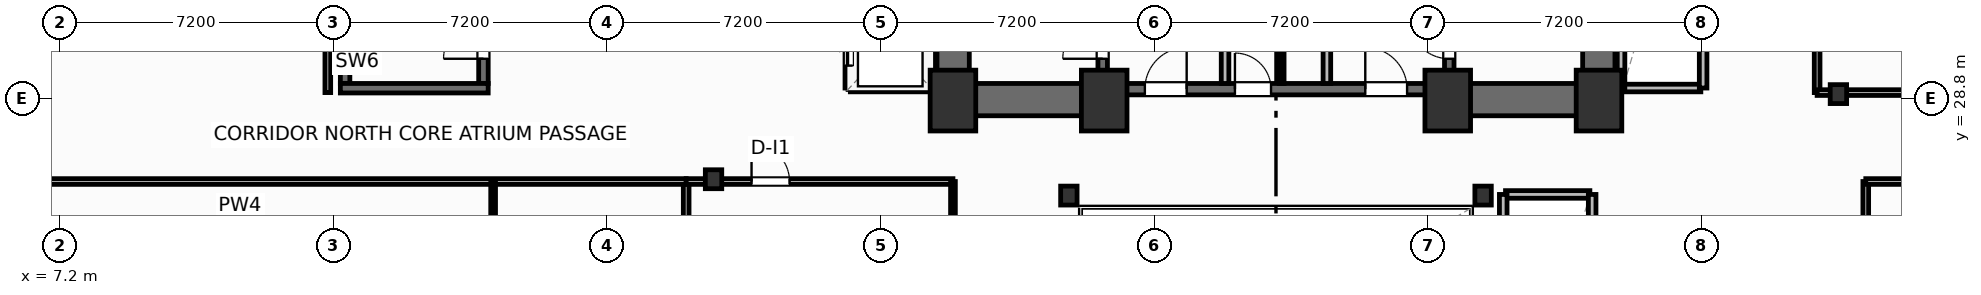
"""IFC4 building model, lengths in metres.
Left out: names, types, materials, properties, quantities, classifications, styles, units other than length and angle.
Written with IfcOpenShell. Run it as: python <this file> out.ifc"""

import sys

from ifc_helpers import new_model, si_unit, direction, frame, frame_2d, origin, origin_2d, place, context, subcontext, project, spatial, rectangle, i_section, extrude, element, fill, save


model = new_model("IFC4")
c1 = context("Model", 3, precision=1e-05, world=origin(), true_north=direction((0.0, 1.0)))
c2 = subcontext(c1, "Body", "Model", "MODEL_VIEW")
j1 = project(units=[si_unit("LENGTHUNIT", "METRE"), si_unit("PLANEANGLEUNIT", "RADIAN")], contexts=[c1])
p1 = place(None, origin())
s1 = spatial("IfcSite", under=j1, at=p1, CompositionType="ELEMENT")
p2 = place(p1, origin())
s2 = spatial("IfcBuilding", under=s1, at=p2, CompositionType="ELEMENT")
p3 = place(p2, frame((0.0, 0.0, 5.4)))
s3 = spatial("IfcBuildingStorey", under=s2, at=p3, CompositionType="ELEMENT", Elevation=5.4)
for number, where, z_axis, x_axis in (
    (1, (30.7, 28.75, 0.0), (0.0, 0.0, 1.0), (1.0, 0.0, 0.0)),
    (2, (34.68, 28.75, 0.0), (0.0, 0.0, 1.0), (1.0, 0.0, 0.0)),
    (3, (43.72, 28.75, 0.0), (0.0, 0.0, 1.0), (1.0, 0.0, 0.0)),
    (4, (47.7, 28.75, 0.0), (0.0, 0.0, 1.0), (1.0, 0.0, 0.0)),
):
    element("IfcColumn", number, at=place(p3, frame(where, z_axis=z_axis, x_axis=x_axis)), inside=s3, PredefinedType="COLUMN", context=c2, shape_type="SweptSolid", body=[
        extrude(rectangle(XDim=1.2, YDim=1.6, at=origin_2d()), origin(), (0.0, 0.0, 1.0), 5.4),
    ])
for number, where, z_axis, x_axis in (
    (5, (33.75, 26.25, 0.0), (0.0, 0.0, 1.0), (1.0, 0.0, 0.0)),
    (6, (44.65, 26.25, 0.0), (0.0, 0.0, 1.0), (1.0, 0.0, 0.0)),
    (7, (24.4, 26.68, 0.0), (0.0, 0.0, 1.0), (1.0, 0.0, 0.0)),
    (8, (54.0, 28.92, 0.0), (0.0, 0.0, 1.0), (1.0, 0.0, 0.0)),
):
    element("IfcColumn", number, at=place(p3, frame(where, z_axis=z_axis, x_axis=x_axis)), inside=s3, PredefinedType="COLUMN", context=c2, shape_type="SweptSolid", body=[
        extrude(i_section(OverallWidth=0.432, OverallDepth=0.498, WebThickness=0.056, FlangeThickness=0.089, FilletRadius=0.025, at=origin_2d()), origin(), (0.0, 0.0, 1.0), 5.4),
    ])
for number, where, z_axis, x_axis in (
    (9, (30.705, 29.2, 0.0), (0.0, 0.0, 1.0), (0.0, 1.0, 0.0)),
    (10, (47.695, 29.2, 0.0), (0.0, 0.0, 1.0), (0.0, 1.0, 0.0)),
):
    element("IfcWall", number, at=place(p3, frame(where, z_axis=z_axis, x_axis=x_axis)), inside=s3, PredefinedType="SHEAR", context=c2, shape_type="SweptSolid", body=[
        extrude(rectangle(XDim=9.22, YDim=0.85, at=frame_2d((4.61, 0.0))), origin(), (0.0, 0.0, 1.0), 5.12),
    ])
for number, where, z_axis, x_axis in (
    (11, (30.28, 28.775, 0.0), (0.0, 0.0, 1.0), (1.0, 0.0, 0.0)),
    (12, (43.6, 28.775, 0.0), (0.0, 0.0, 1.0), (1.0, 0.0, 0.0)),
):
    element("IfcWall", number, at=place(p3, frame(where, z_axis=z_axis, x_axis=x_axis)), inside=s3, PredefinedType="SHEAR", context=c2, shape_type="SweptSolid", body=[
        extrude(rectangle(XDim=4.52, YDim=0.85, at=frame_2d((2.26, 0.0))), origin(), (0.0, 0.0, 1.0), 5.12),
    ])
p4 = place(p3, frame((34.8, 29.05, 0.0), z_axis=(0.0, 0.0, 1.0), x_axis=(1.0, 0.0, 0.0)))
e13 = element("IfcWall", 13, at=p4, inside=s3, PredefinedType="SHEAR", context=c2, shape_type="SweptSolid", body=[
    extrude(rectangle(XDim=8.8, YDim=0.3, at=frame_2d((4.4, 0.0))), origin(), (0.0, 0.0, 1.0), 5.12),
])
p5 = place(p4, frame((0.95, 0.0, 0.0)))
e14 = element("IfcOpeningElement", 14, at=p5, cuts=e13, PredefinedType="OPENING", context=c2, shape_type="SweptSolid", body=[
    extrude(rectangle(XDim=1.1, YDim=2.15, at=frame_2d((0.55, 1.075))), frame((0.0, 0.16, 0.0), z_axis=(0.0, -1.0, 0.0), x_axis=(1.0, 0.0, 0.0)), (0.0, 0.0, 1.0), 0.32),
])
p6 = place(p4, frame((6.75, 0.0, 0.0)))
e15 = element("IfcOpeningElement", 15, at=p6, cuts=e13, PredefinedType="OPENING", context=c2, shape_type="SweptSolid", body=[
    extrude(rectangle(XDim=1.1, YDim=2.15, at=frame_2d((0.55, 1.075))), frame((0.0, 0.16, 0.0), z_axis=(0.0, -1.0, 0.0), x_axis=(1.0, 0.0, 0.0)), (0.0, 0.0, 1.0), 0.32),
])
p7 = place(p4, frame((3.32, 0.0, 0.0)))
e16 = element("IfcOpeningElement", 16, at=p7, cuts=e13, PredefinedType="OPENING", context=c2, shape_type="SweptSolid", body=[
    extrude(rectangle(XDim=0.95, YDim=2.15, at=frame_2d((0.475, 1.075))), frame((0.0, 0.16, 0.0), z_axis=(0.0, -1.0, 0.0), x_axis=(1.0, 0.0, 0.0)), (0.0, 0.0, 1.0), 0.32),
])
p8 = place(p3, frame((34.64, 29.2, 0.0), z_axis=(0.0, 0.0, 1.0), x_axis=(0.0, 1.0, 0.0)))
e17 = element("IfcWall", 17, at=p8, inside=s3, PredefinedType="SHEAR", context=c2, shape_type="SweptSolid", body=[
    extrude(rectangle(XDim=9.22, YDim=0.25, at=frame_2d((4.61, 0.0))), origin(), (0.0, 0.0, 1.0), 5.12),
])
p9 = place(p8, frame((0.65, 0.0, 0.0)))
e18 = element("IfcOpeningElement", 18, at=p9, cuts=e17, PredefinedType="OPENING", context=c2, shape_type="SweptSolid", body=[
    extrude(rectangle(XDim=1.05, YDim=2.15, at=frame_2d((0.525, 1.075))), frame((0.0, 0.135, 0.0), z_axis=(0.0, -1.0, 0.0), x_axis=(1.0, 0.0, 0.0)), (0.0, 0.0, 1.0), 0.27),
])
p10 = place(p3, frame((43.76, 29.2, 0.0), z_axis=(0.0, 0.0, 1.0), x_axis=(0.0, 1.0, 0.0)))
e19 = element("IfcWall", 19, at=p10, inside=s3, PredefinedType="SHEAR", context=c2, shape_type="SweptSolid", body=[
    extrude(rectangle(XDim=9.22, YDim=0.25, at=frame_2d((4.61, 0.0))), origin(), (0.0, 0.0, 1.0), 5.12),
])
p11 = place(p10, frame((0.65, 0.0, 0.0)))
e20 = element("IfcOpeningElement", 20, at=p11, cuts=e19, PredefinedType="OPENING", context=c2, shape_type="SweptSolid", body=[
    extrude(rectangle(XDim=1.05, YDim=2.15, at=frame_2d((0.525, 1.075))), frame((0.0, 0.135, 0.0), z_axis=(0.0, -1.0, 0.0), x_axis=(1.0, 0.0, 0.0)), (0.0, 0.0, 1.0), 0.27),
])
p12 = place(p3, frame((14.705, 29.2, 0.0), z_axis=(0.0, 0.0, 1.0), x_axis=(0.0, 1.0, 0.0)))
e21 = element("IfcWall", 21, at=p12, inside=s3, PredefinedType="SHEAR", context=c2, shape_type="SweptSolid", body=[
    extrude(rectangle(XDim=9.22, YDim=0.25, at=frame_2d((4.61, 0.0))), origin(), (0.0, 0.0, 1.0), 5.12),
])
p13 = place(p3, frame((18.345, 29.2, 0.0), z_axis=(0.0, 0.0, 1.0), x_axis=(0.0, 1.0, 0.0)))
e22 = element("IfcWall", 22, at=p13, inside=s3, PredefinedType="SHEAR", context=c2, shape_type="SweptSolid", body=[
    extrude(rectangle(XDim=9.22, YDim=0.25, at=frame_2d((4.61, 0.0))), origin(), (0.0, 0.0, 1.0), 5.12),
])
p14 = place(p13, frame((0.65, 0.0, 0.0)))
e23 = element("IfcOpeningElement", 23, at=p14, cuts=e22, PredefinedType="OPENING", context=c2, shape_type="SweptSolid", body=[
    extrude(rectangle(XDim=1.05, YDim=2.15, at=frame_2d((0.525, 1.075))), frame((0.0, 0.135, 0.0), z_axis=(0.0, -1.0, 0.0), x_axis=(1.0, 0.0, 0.0)), (0.0, 0.0, 1.0), 0.27),
])
p15 = place(p3, frame((14.58, 29.075, 0.0), z_axis=(0.0, 0.0, 1.0), x_axis=(1.0, 0.0, 0.0)))
e24 = element("IfcWall", 24, at=p15, inside=s3, PredefinedType="SHEAR", context=c2, shape_type="SweptSolid", body=[
    extrude(rectangle(XDim=3.89, YDim=0.25, at=frame_2d((1.945, 0.0))), origin(), (0.0, 0.0, 1.0), 5.12),
])
p16 = place(p3, frame((23.68, 0.25, 0.0), z_axis=(0.0, 0.0, 1.0), x_axis=(0.0, 1.0, 0.0)))
e25 = element("IfcWall", 25, at=p16, inside=s3, PredefinedType="PARTITIONING", context=c2, shape_type="SweptSolid", body=[
    extrude(rectangle(XDim=26.37, YDim=0.15, at=frame_2d((13.185, 0.0))), origin(), (0.0, 0.0, 1.0), 5.12),
])
p17 = place(p16, frame((14.514, 0.0, 0.0)))
e26 = element("IfcOpeningElement", 26, at=p17, cuts=e25, PredefinedType="OPENING", context=c2, shape_type="SweptSolid", body=[
    extrude(rectangle(XDim=2.0, YDim=2.05, at=frame_2d((1.0, 1.025))), frame((0.0, 0.085, 0.0), z_axis=(0.0, -1.0, 0.0), x_axis=(1.0, 0.0, 0.0)), (0.0, 0.0, 1.0), 0.17),
])
p18 = place(p3, frame((54.72, 0.25, 0.0), z_axis=(0.0, 0.0, 1.0), x_axis=(0.0, 1.0, 0.0)))
e27 = element("IfcWall", 27, at=p18, inside=s3, PredefinedType="PARTITIONING", context=c2, shape_type="SweptSolid", body=[
    extrude(rectangle(XDim=26.37, YDim=0.15, at=frame_2d((13.185, 0.0))), origin(), (0.0, 0.0, 1.0), 5.12),
])
p19 = place(p18, frame((14.514, 0.0, 0.0)))
e28 = element("IfcOpeningElement", 28, at=p19, cuts=e27, PredefinedType="OPENING", context=c2, shape_type="SweptSolid", body=[
    extrude(rectangle(XDim=2.0, YDim=2.05, at=frame_2d((1.0, 1.025))), frame((0.0, 0.085, 0.0), z_axis=(0.0, -1.0, 0.0), x_axis=(1.0, 0.0, 0.0)), (0.0, 0.0, 1.0), 0.17),
])
for number, where, z_axis, x_axis in (
    (29, (0.2, 26.62, 0.0), (0.0, 0.0, 1.0), (1.0, 0.0, 0.0)),
    (30, (54.72, 26.62, 0.0), (0.0, 0.0, 1.0), (1.0, 0.0, 0.0)),
):
    element("IfcWall", number, at=place(p3, frame(where, z_axis=z_axis, x_axis=x_axis)), inside=s3, PredefinedType="PARTITIONING", context=c2, shape_type="SweptSolid", body=[
        extrude(rectangle(XDim=23.48, YDim=0.15, at=frame_2d((11.74, 0.0))), origin(), (0.0, 0.0, 1.0), 5.12),
    ])
p20 = place(p3, frame((53.44, 28.96, 0.0), z_axis=(0.0, 0.0, 1.0), x_axis=(0.0, 1.0, 0.0)))
e31 = element("IfcWall", 31, at=p20, inside=s3, PredefinedType="PARTITIONING", context=c2, shape_type="SweptSolid", body=[
    extrude(rectangle(XDim=21.34, YDim=0.15, at=frame_2d((10.67, 0.0))), origin(), (0.0, 0.0, 1.0), 5.12),
])
p21 = place(p20, frame((6.0, 0.0, 0.0)))
e32 = element("IfcOpeningElement", 32, at=p21, cuts=e31, PredefinedType="OPENING", context=c2, shape_type="SweptSolid", body=[
    extrude(rectangle(XDim=2.0, YDim=2.05, at=frame_2d((1.0, 1.025))), frame((0.0, 0.085, 0.0), z_axis=(0.0, -1.0, 0.0), x_axis=(1.0, 0.0, 0.0)), (0.0, 0.0, 1.0), 0.17),
])
p22 = place(p3, frame((53.44, 28.96, 0.0), z_axis=(0.0, 0.0, 1.0), x_axis=(1.0, 0.0, 0.0)))
e33 = element("IfcWall", 33, at=p22, inside=s3, PredefinedType="PARTITIONING", context=c2, shape_type="SweptSolid", body=[
    extrude(rectangle(XDim=24.76, YDim=0.15, at=frame_2d((12.38, 0.0))), origin(), (0.0, 0.0, 1.0), 4.332),
])
p23 = place(p3, frame((14.25, 28.96, 0.0), z_axis=(0.0, 0.0, 1.0), x_axis=(0.0, 1.0, 0.0)))
e34 = element("IfcWall", 34, at=p23, inside=s3, PredefinedType="PARTITIONING", context=c2, shape_type="SweptSolid", body=[
    extrude(rectangle(XDim=21.34, YDim=0.15, at=frame_2d((10.67, 0.0))), origin(), (0.0, 0.0, 1.0), 5.12),
])
p24 = place(p23, frame((10.62, 0.0, 0.0)))
e35 = element("IfcOpeningElement", 35, at=p24, cuts=e34, PredefinedType="OPENING", context=c2, shape_type="SweptSolid", body=[
    extrude(rectangle(XDim=1.0, YDim=2.05, at=frame_2d((0.5, 1.025))), frame((0.0, 0.085, 0.0), z_axis=(0.0, -1.0, 0.0), x_axis=(1.0, 0.0, 0.0)), (0.0, 0.0, 1.0), 0.17),
])
p25 = place(p3, frame((23.68, 26.62, 0.0), z_axis=(0.0, 0.0, 1.0), x_axis=(1.0, 0.0, 0.0)))
e36 = element("IfcWall", 36, at=p25, inside=s3, PredefinedType="PARTITIONING", context=c2, shape_type="SweptSolid", body=[
    extrude(rectangle(XDim=7.02, YDim=0.15, at=frame_2d((3.51, 0.0))), origin(), (0.0, 0.0, 1.0), 4.332),
])
p26 = place(p25, frame((1.72, 0.0, 0.0)))
e37 = element("IfcOpeningElement", 37, at=p26, cuts=e36, PredefinedType="OPENING", context=c2, shape_type="SweptSolid", body=[
    extrude(rectangle(XDim=1.0, YDim=2.05, at=frame_2d((0.5, 1.025))), frame((0.0, 0.085, 0.0), z_axis=(0.0, -1.0, 0.0), x_axis=(1.0, 0.0, 0.0)), (0.0, 0.0, 1.0), 0.17),
])
p27 = place(p3, frame((30.7, 19.24, 0.0), z_axis=(0.0, 0.0, 1.0), x_axis=(0.0, 1.0, 0.0)))
e38 = element("IfcWall", 38, at=p27, inside=s3, PredefinedType="PARTITIONING", context=c2, shape_type="SweptSolid", body=[
    extrude(rectangle(XDim=7.38, YDim=0.125, at=frame_2d((3.69, 0.0))), origin(), (0.0, 0.0, 1.0), 5.12),
])
p28 = place(p3, frame((18.6, 19.24, 0.0), z_axis=(0.0, 0.0, 1.0), x_axis=(0.0, 1.0, 0.0)))
e39 = element("IfcWall", 39, at=p28, inside=s3, PredefinedType="PARTITIONING", context=c2, shape_type="SweptSolid", body=[
    extrude(rectangle(XDim=7.34, YDim=0.125, at=frame_2d((3.67, 0.0))), origin(), (0.0, 0.0, 1.0), 5.12),
])
for number, where, z_axis, x_axis in (
    (40, (37.86, 29.2, 0.0), (0.0, 0.0, 1.0), (0.0, 1.0, 0.0)),
    (41, (40.54, 29.2, 0.0), (0.0, 0.0, 1.0), (0.0, 1.0, 0.0)),
):
    element("IfcWall", number, at=place(p3, frame(where, z_axis=z_axis, x_axis=x_axis)), inside=s3, PredefinedType="PARTITIONING", context=c2, shape_type="SweptSolid", body=[
        extrude(rectangle(XDim=5.18, YDim=0.2, at=frame_2d((2.59, 0.0))), origin(), (0.0, 0.0, 1.0), 5.12),
    ])
p29 = place(p3, frame((39.35, 29.2, 0.0), z_axis=(0.0, 0.0, 1.0), x_axis=(0.0, 1.0, 0.0)))
e42 = element("IfcWall", 42, at=p29, inside=s3, PredefinedType="PARTITIONING", context=c2, shape_type="SweptSolid", body=[
    extrude(rectangle(XDim=5.22, YDim=0.125, at=frame_2d((2.61, 0.0))), origin(), (0.0, 0.0, 1.0), 5.12),
])
p30 = place(p29, frame((2.05, 0.0, 0.0)))
e43 = element("IfcOpeningElement", 43, at=p30, cuts=e42, PredefinedType="OPENING", context=c2, shape_type="SweptSolid", body=[
    extrude(rectangle(XDim=0.85, YDim=2.05, at=frame_2d((0.425, 1.025))), frame((0.0, 0.073, 0.0), z_axis=(0.0, -1.0, 0.0), x_axis=(1.0, 0.0, 0.0)), (0.0, 0.0, 1.0), 0.145),
])
p31 = place(p3, frame((28.0, 29.08, 0.0), z_axis=(0.0, 0.0, 1.0), x_axis=(1.0, 0.0, 0.0)))
e44 = element("IfcWall", 44, at=p31, inside=s3, PredefinedType="PARTITIONING", context=c2, shape_type="SweptSolid", body=[
    extrude(rectangle(XDim=2.1, YDim=0.2, at=frame_2d((1.05, 0.0))), origin(), (0.0, 0.0, 1.0), 5.12),
])
p32 = place(p3, frame((30.12, 29.08, 0.0), z_axis=(0.0, 0.0, 1.0), x_axis=(0.0, 1.0, 0.0)))
e45 = element("IfcWall", 45, at=p32, inside=s3, PredefinedType="PARTITIONING", context=c2, shape_type="SweptSolid", body=[
    extrude(rectangle(XDim=6.89, YDim=0.2, at=frame_2d((3.445, 0.0))), origin(), (0.0, 0.0, 1.0), 5.12),
])
p33 = place(p3, frame((27.96, 29.08, 0.0), z_axis=(0.0, 0.0, 1.0), x_axis=(0.0, 1.0, 0.0)))
e46 = element("IfcWall", 46, at=p33, inside=s3, PredefinedType="PARTITIONING", context=c2, shape_type="SweptSolid", body=[
    extrude(rectangle(XDim=6.89, YDim=0.2, at=frame_2d((3.445, 0.0))), origin(), (0.0, 0.0, 1.0), 5.12),
])
p34 = place(p33, frame((0.59, 0.0, 0.0)))
e47 = element("IfcOpeningElement", 47, at=p34, cuts=e46, PredefinedType="OPENING", context=c2, shape_type="SweptSolid", body=[
    extrude(rectangle(XDim=1.1, YDim=2.15, at=frame_2d((0.55, 1.075))), frame((0.0, 0.11, 0.0), z_axis=(0.0, -1.0, 0.0), x_axis=(1.0, 0.0, 0.0)), (0.0, 0.0, 1.0), 0.22),
])
p35 = place(p33, frame((2.89, 0.0, 0.0)))
e48 = element("IfcOpeningElement", 48, at=p35, cuts=e46, PredefinedType="OPENING", context=c2, shape_type="SweptSolid", body=[
    extrude(rectangle(XDim=1.1, YDim=2.15, at=frame_2d((0.55, 1.075))), frame((0.0, 0.11, 0.0), z_axis=(0.0, -1.0, 0.0), x_axis=(1.0, 0.0, 0.0)), (0.0, 0.0, 1.0), 0.22),
])
p36 = place(p33, frame((5.19, 0.0, 0.0)))
e49 = element("IfcOpeningElement", 49, at=p36, cuts=e46, PredefinedType="OPENING", context=c2, shape_type="SweptSolid", body=[
    extrude(rectangle(XDim=1.1, YDim=2.15, at=frame_2d((0.55, 1.075))), frame((0.0, 0.11, 0.0), z_axis=(0.0, -1.0, 0.0), x_axis=(1.0, 0.0, 0.0)), (0.0, 0.0, 1.0), 0.22),
])
p37 = place(p3, frame((48.32, 29.08, 0.0), z_axis=(0.0, 0.0, 1.0), x_axis=(1.0, 0.0, 0.0)))
e50 = element("IfcWall", 50, at=p37, inside=s3, PredefinedType="PARTITIONING", context=c2, shape_type="SweptSolid", body=[
    extrude(rectangle(XDim=2.06, YDim=0.2, at=frame_2d((1.03, 0.0))), origin(), (0.0, 0.0, 1.0), 4.332),
])
for number, where, z_axis, x_axis in (
    (51, (48.28, 29.08, 0.0), (0.0, 0.0, 1.0), (0.0, 1.0, 0.0)),
    (52, (50.44, 29.08, 0.0), (0.0, 0.0, 1.0), (0.0, 1.0, 0.0)),
):
    element("IfcWall", number, at=place(p3, frame(where, z_axis=z_axis, x_axis=x_axis)), inside=s3, PredefinedType="PARTITIONING", context=c2, shape_type="SweptSolid", body=[
        extrude(rectangle(XDim=6.89, YDim=0.2, at=frame_2d((3.445, 0.0))), origin(), (0.0, 0.0, 1.0), 5.12),
    ])
p38 = place(p3, frame((45.24, 26.28, 0.0), z_axis=(0.0, 0.0, 1.0), x_axis=(1.0, 0.0, 0.0)))
e53 = element("IfcWall", 53, at=p38, inside=s3, PredefinedType="PARTITIONING", context=c2, shape_type="SweptSolid", body=[
    extrude(rectangle(XDim=2.22, YDim=0.2, at=frame_2d((1.11, 0.0))), origin(), (0.0, 0.0, 1.0), 5.12),
])
for number, where, z_axis, x_axis in (
    (54, (45.18, 19.38, 0.0), (0.0, 0.0, 1.0), (0.0, 1.0, 0.0)),
    (55, (47.52, 19.38, 0.0), (0.0, 0.0, 1.0), (0.0, 1.0, 0.0)),
):
    element("IfcWall", number, at=place(p3, frame(where, z_axis=z_axis, x_axis=x_axis)), inside=s3, PredefinedType="PARTITIONING", context=c2, shape_type="SweptSolid", body=[
        extrude(rectangle(XDim=6.9, YDim=0.2, at=frame_2d((3.45, 0.0))), origin(), (0.0, 0.0, 1.0), 5.12),
    ])
p39 = place(p26, origin())
e56 = element("IfcDoor", 56, at=p39, inside=s3, OperationType="SINGLE_SWING_LEFT", PredefinedType="DOOR", context=c2, shape_type="SweptSolid", body=[
    extrude(rectangle(XDim=1.0, YDim=2.05, at=frame_2d((0.5, 1.025))), frame((0.0, 0.025, 0.0), z_axis=(0.0, -1.0, 0.0), x_axis=(1.0, 0.0, 0.0)), (0.0, 0.0, 1.0), 0.05),
])
fill(e37, e56)
p40 = place(p9, origin())
e57 = element("IfcDoor", 57, at=p40, inside=s3, OperationType="SINGLE_SWING_LEFT", PredefinedType="DOOR", context=c2, shape_type="SweptSolid", body=[
    extrude(rectangle(XDim=1.05, YDim=2.15, at=frame_2d((0.525, 1.075))), frame((0.0, 0.025, 0.0), z_axis=(0.0, -1.0, 0.0), x_axis=(1.0, 0.0, 0.0)), (0.0, 0.0, 1.0), 0.05),
])
fill(e18, e57)
p41 = place(p11, origin())
e58 = element("IfcDoor", 58, at=p41, inside=s3, OperationType="SINGLE_SWING_RIGHT", PredefinedType="DOOR", context=c2, shape_type="SweptSolid", body=[
    extrude(rectangle(XDim=1.05, YDim=2.15, at=frame_2d((0.525, 1.075))), frame((0.0, 0.025, 0.0), z_axis=(0.0, -1.0, 0.0), x_axis=(1.0, 0.0, 0.0)), (0.0, 0.0, 1.0), 0.05),
])
fill(e20, e58)
p42 = place(p14, origin())
e59 = element("IfcDoor", 59, at=p42, inside=s3, OperationType="SINGLE_SWING_LEFT", PredefinedType="DOOR", context=c2, shape_type="SweptSolid", body=[
    extrude(rectangle(XDim=1.05, YDim=2.15, at=frame_2d((0.525, 1.075))), frame((0.0, 0.025, 0.0), z_axis=(0.0, -1.0, 0.0), x_axis=(1.0, 0.0, 0.0)), (0.0, 0.0, 1.0), 0.05),
])
fill(e23, e59)
p43 = place(p5, origin())
e60 = element("IfcDoor", 60, at=p43, inside=s3, OperationType="SINGLE_SWING_RIGHT", PredefinedType="DOOR", context=c2, shape_type="SweptSolid", body=[
    extrude(rectangle(XDim=1.1, YDim=2.15, at=frame_2d((0.55, 1.075))), frame((0.0, 0.025, 0.0), z_axis=(0.0, -1.0, 0.0), x_axis=(1.0, 0.0, 0.0)), (0.0, 0.0, 1.0), 0.05),
])
fill(e14, e60)
p44 = place(p6, origin())
e61 = element("IfcDoor", 61, at=p44, inside=s3, OperationType="SINGLE_SWING_LEFT", PredefinedType="DOOR", context=c2, shape_type="SweptSolid", body=[
    extrude(rectangle(XDim=1.1, YDim=2.15, at=frame_2d((0.55, 1.075))), frame((0.0, 0.025, 0.0), z_axis=(0.0, -1.0, 0.0), x_axis=(1.0, 0.0, 0.0)), (0.0, 0.0, 1.0), 0.05),
])
fill(e15, e61)
p45 = place(p7, origin())
e62 = element("IfcDoor", 62, at=p45, inside=s3, OperationType="SINGLE_SWING_LEFT", PredefinedType="DOOR", context=c2, shape_type="SweptSolid", body=[
    extrude(rectangle(XDim=0.95, YDim=2.15, at=frame_2d((0.475, 1.075))), frame((0.0, 0.025, 0.0), z_axis=(0.0, -1.0, 0.0), x_axis=(1.0, 0.0, 0.0)), (0.0, 0.0, 1.0), 0.05),
])
fill(e16, e62)
p46 = place(p34, origin())
e63 = element("IfcDoor", 63, at=p46, inside=s3, OperationType="SLIDING_TO_LEFT", PredefinedType="DOOR", context=c2, shape_type="SweptSolid", body=[
    extrude(rectangle(XDim=1.1, YDim=2.15, at=frame_2d((0.55, 1.075))), frame((0.0, 0.025, 0.0), z_axis=(0.0, -1.0, 0.0), x_axis=(1.0, 0.0, 0.0)), (0.0, 0.0, 1.0), 0.05),
])
fill(e47, e63)
save(model, sys.argv[1])
